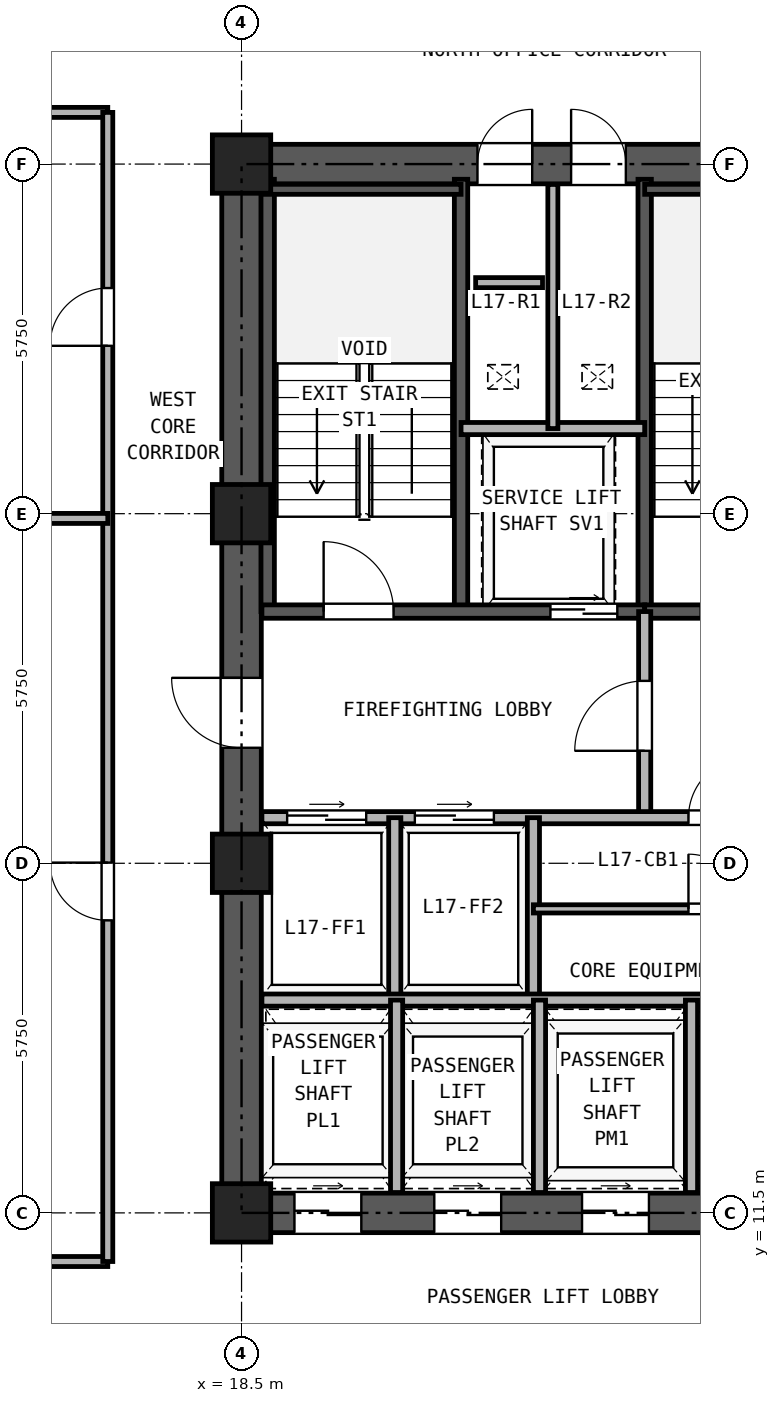
"""IFC4 building model, lengths in metres.
Left out: names, types, materials, properties, quantities, classifications, styles, units other than length and angle.
Written with IfcOpenShell. Run it as: python <this file> out.ifc"""

import sys

from ifc_helpers import new_model, si_unit, direction, frame, frame_2d, origin, origin_2d, place, context, subcontext, project, spatial, rectangle, hollow_rectangle, extrude, source, transform, mapped, element, fill, save


model = new_model("IFC4")
c1 = context("Model", 3, precision=1e-05, world=origin(), true_north=direction((0.0, 1.0)))
c2 = subcontext(c1, "Body", "Model", "MODEL_VIEW")
j1 = project(units=[si_unit("LENGTHUNIT", "METRE"), si_unit("PLANEANGLEUNIT", "RADIAN")], contexts=[c1])
p1 = place(None, origin())
s1 = spatial("IfcSite", under=j1, at=p1, CompositionType="ELEMENT")
p2 = place(p1, origin())
s2 = spatial("IfcBuilding", under=s1, at=p2, CompositionType="ELEMENT")
p3 = place(p2, frame((0.0, 0.0, 65.7)))
s3 = spatial("IfcBuildingStorey", under=s2, at=p3, CompositionType="ELEMENT", Elevation=65.7)
m1 = source(origin(), c2, "Body", "SweptSolid", [
    extrude(hollow_rectangle(XDim=0.96, YDim=0.96, WallThickness=0.06, at=origin_2d()), origin(), (0.0, 0.0, 1.0), 3.32),
])
for number, where, z_axis, x_axis in (
    (1, (18.5, 11.5, 0.0), (0.0, 0.0, 1.0), (1.0, 0.0, 0.0)),
    (2, (18.5, 17.25, 0.0), (0.0, 0.0, 1.0), (1.0, 0.0, 0.0)),
    (3, (18.5, 23.0, 0.0), (0.0, 0.0, 1.0), (1.0, 0.0, 0.0)),
    (4, (18.5, 28.75, 0.0), (0.0, 0.0, 1.0), (1.0, 0.0, 0.0)),
):
    element("IfcColumn", number, at=place(p3, frame(where, z_axis=z_axis, x_axis=x_axis)), inside=s3, PredefinedType="COLUMN", context=c2, shape_type="MappedRepresentation", body=[
        mapped(m1, transform((0.0, 0.0, 0.0), x_axis=(1.0, 0.0, 0.0), y_axis=(0.0, 1.0, 0.0), z_axis=(0.0, 0.0, 1.0), scale=1.0)),
    ])
p4 = place(p3, frame((18.175, 11.5, 0.0), z_axis=(0.0, 0.0, 1.0), x_axis=(1.0, 0.0, 0.0)))
e5 = element("IfcWall", 5, at=p4, inside=s3, PredefinedType="SHEAR", context=c2, shape_type="SweptSolid", body=[
    extrude(rectangle(XDim=10.65, YDim=0.65, at=frame_2d((5.325, 0.0))), origin(), (0.0, 0.0, 1.0), 3.32),
])
p5 = place(p4, frame((1.195, 0.0, 0.0)))
e6 = element("IfcOpeningElement", 6, at=p5, cuts=e5, PredefinedType="OPENING", context=c2, shape_type="SweptSolid", body=[
    extrude(rectangle(XDim=1.1, YDim=2.25, at=frame_2d((0.55, 1.125))), frame((0.0, 0.335, 0.0), z_axis=(0.0, -1.0, 0.0), x_axis=(1.0, 0.0, 0.0)), (0.0, 0.0, 1.0), 0.67),
])
p6 = place(p4, frame((3.495, 0.0, 0.0)))
e7 = element("IfcOpeningElement", 7, at=p6, cuts=e5, PredefinedType="OPENING", context=c2, shape_type="SweptSolid", body=[
    extrude(rectangle(XDim=1.1, YDim=2.25, at=frame_2d((0.55, 1.125))), frame((0.0, 0.335, 0.0), z_axis=(0.0, -1.0, 0.0), x_axis=(1.0, 0.0, 0.0)), (0.0, 0.0, 1.0), 0.67),
])
p7 = place(p4, frame((5.925, 0.0, 0.0)))
e8 = element("IfcOpeningElement", 8, at=p7, cuts=e5, PredefinedType="OPENING", context=c2, shape_type="SweptSolid", body=[
    extrude(rectangle(XDim=1.1, YDim=2.25, at=frame_2d((0.55, 1.125))), frame((0.0, 0.335, 0.0), z_axis=(0.0, -1.0, 0.0), x_axis=(1.0, 0.0, 0.0)), (0.0, 0.0, 1.0), 0.67),
])
p8 = place(p4, frame((8.325, 0.0, 0.0)))
e9 = element("IfcOpeningElement", 9, at=p8, cuts=e5, PredefinedType="OPENING", context=c2, shape_type="SweptSolid", body=[
    extrude(rectangle(XDim=1.1, YDim=2.25, at=frame_2d((0.55, 1.125))), frame((0.0, 0.335, 0.0), z_axis=(0.0, -1.0, 0.0), x_axis=(1.0, 0.0, 0.0)), (0.0, 0.0, 1.0), 0.67),
])
p9 = place(p3, frame((18.175, 28.75, 0.0), z_axis=(0.0, 0.0, 1.0), x_axis=(1.0, 0.0, 0.0)))
e10 = element("IfcWall", 10, at=p9, inside=s3, PredefinedType="SHEAR", context=c2, shape_type="SweptSolid", body=[
    extrude(rectangle(XDim=10.65, YDim=0.65, at=frame_2d((5.325, 0.0))), origin(), (0.0, 0.0, 1.0), 3.32),
])
p10 = place(p9, frame((4.205, 0.0, 0.0)))
e11 = element("IfcOpeningElement", 11, at=p10, cuts=e10, PredefinedType="OPENING", context=c2, shape_type="SweptSolid", body=[
    extrude(rectangle(XDim=0.9, YDim=2.05, at=frame_2d((0.45, 1.025))), frame((0.0, 0.335, 0.0), z_axis=(0.0, -1.0, 0.0), x_axis=(1.0, 0.0, 0.0)), (0.0, 0.0, 1.0), 0.67),
])
p11 = place(p9, frame((5.745, 0.0, 0.0)))
e12 = element("IfcOpeningElement", 12, at=p11, cuts=e10, PredefinedType="OPENING", context=c2, shape_type="SweptSolid", body=[
    extrude(rectangle(XDim=0.9, YDim=2.05, at=frame_2d((0.45, 1.025))), frame((0.0, 0.335, 0.0), z_axis=(0.0, -1.0, 0.0), x_axis=(1.0, 0.0, 0.0)), (0.0, 0.0, 1.0), 0.67),
])
p12 = place(p3, frame((18.5, 11.825, 0.0), z_axis=(0.0, 0.0, 1.0), x_axis=(0.0, 1.0, 0.0)))
e13 = element("IfcWall", 13, at=p12, inside=s3, PredefinedType="SHEAR", context=c2, shape_type="SweptSolid", body=[
    extrude(rectangle(XDim=16.6, YDim=0.65, at=frame_2d((8.3, 0.0))), origin(), (0.0, 0.0, 1.0), 3.32),
])
p13 = place(p12, frame((7.325, 0.0, 0.0)))
e14 = element("IfcOpeningElement", 14, at=p13, cuts=e13, PredefinedType="OPENING", context=c2, shape_type="SweptSolid", body=[
    extrude(rectangle(XDim=1.15, YDim=2.2, at=frame_2d((0.575, 1.1))), frame((0.0, 0.335, 0.0), z_axis=(0.0, -1.0, 0.0), x_axis=(1.0, 0.0, 0.0)), (0.0, 0.0, 1.0), 0.67),
])
for number, where, z_axis, x_axis in (
    (15, (18.93, 21.39, 0.0), (0.0, 0.0, 1.0), (0.0, 1.0, 0.0)),
    (16, (22.11, 21.39, 0.0), (0.0, 0.0, 1.0), (0.0, 1.0, 0.0)),
    (17, (25.13, 21.39, 0.0), (0.0, 0.0, 1.0), (0.0, 1.0, 0.0)),
):
    element("IfcWall", number, at=place(p3, frame(where, z_axis=z_axis, x_axis=x_axis)), inside=s3, PredefinedType="SOLIDWALL", context=c2, shape_type="SweptSolid", body=[
        extrude(rectangle(XDim=7.11, YDim=0.22, at=frame_2d((3.555, 0.0))), origin(), (0.0, 0.0, 1.0), 3.32),
    ])
p14 = place(p3, frame((18.835, 28.335, 0.0), z_axis=(0.0, 0.0, 1.0), x_axis=(1.0, 0.0, 0.0)))
e18 = element("IfcWall", 18, at=p14, inside=s3, PredefinedType="PARTITIONING", context=c2, shape_type="SweptSolid", body=[
    extrude(rectangle(XDim=3.275, YDim=0.165, at=frame_2d((1.638, 0.0))), origin(), (0.0, 0.0, 1.0), 3.32),
])
p15 = place(p3, frame((25.13, 28.335, 0.0), z_axis=(0.0, 0.0, 1.0), x_axis=(1.0, 0.0, 0.0)))
e19 = element("IfcWall", 19, at=p15, inside=s3, PredefinedType="PARTITIONING", context=c2, shape_type="SweptSolid", body=[
    extrude(rectangle(XDim=3.035, YDim=0.165, at=frame_2d((1.518, 0.0))), origin(), (0.0, 0.0, 1.0), 3.32),
])
p16 = place(p3, frame((18.835, 21.39, 0.0), z_axis=(0.0, 0.0, 1.0), x_axis=(1.0, 0.0, 0.0)))
e20 = element("IfcWall", 20, at=p16, inside=s3, PredefinedType="SOLIDWALL", context=c2, shape_type="SweptSolid", body=[
    extrude(rectangle(XDim=6.295, YDim=0.22, at=frame_2d((3.147, 0.0))), origin(), (0.0, 0.0, 1.0), 3.32),
])
p17 = place(p16, frame((1.015, 0.0, 0.0)))
e21 = element("IfcOpeningElement", 21, at=p17, cuts=e20, PredefinedType="OPENING", context=c2, shape_type="SweptSolid", body=[
    extrude(rectangle(XDim=1.15, YDim=2.2, at=frame_2d((0.575, 1.1))), frame((0.0, 0.12, 0.0), z_axis=(0.0, -1.0, 0.0), x_axis=(1.0, 0.0, 0.0)), (0.0, 0.0, 1.0), 0.24),
])
p18 = place(p16, frame((4.745, 0.0, 0.0)))
e22 = element("IfcOpeningElement", 22, at=p18, cuts=e20, PredefinedType="OPENING", context=c2, shape_type="SweptSolid", body=[
    extrude(rectangle(XDim=1.1, YDim=2.25, at=frame_2d((0.55, 1.125))), frame((0.0, 0.12, 0.0), z_axis=(0.0, -1.0, 0.0), x_axis=(1.0, 0.0, 0.0)), (0.0, 0.0, 1.0), 0.24),
])
p19 = place(p3, frame((25.13, 21.39, 0.0), z_axis=(0.0, 0.0, 1.0), x_axis=(1.0, 0.0, 0.0)))
e23 = element("IfcWall", 23, at=p19, inside=s3, PredefinedType="SOLIDWALL", context=c2, shape_type="SweptSolid", body=[
    extrude(rectangle(XDim=3.035, YDim=0.22, at=frame_2d((1.518, 0.0))), origin(), (0.0, 0.0, 1.0), 3.32),
])
p20 = place(p19, frame((0.92, 0.0, 0.0)))
e24 = element("IfcOpeningElement", 24, at=p20, cuts=e23, PredefinedType="OPENING", context=c2, shape_type="SweptSolid", body=[
    extrude(rectangle(XDim=1.15, YDim=2.2, at=frame_2d((0.575, 1.1))), frame((0.0, 0.12, 0.0), z_axis=(0.0, -1.0, 0.0), x_axis=(1.0, 0.0, 0.0)), (0.0, 0.0, 1.0), 0.24),
])
p21 = place(p3, frame((22.11, 24.4, 0.0), z_axis=(0.0, 0.0, 1.0), x_axis=(1.0, 0.0, 0.0)))
e25 = element("IfcWall", 25, at=p21, inside=s3, PredefinedType="PARTITIONING", context=c2, shape_type="SweptSolid", body=[
    extrude(rectangle(XDim=3.02, YDim=0.2, at=frame_2d((1.51, 0.0))), origin(), (0.0, 0.0, 1.0), 3.32),
])
p22 = place(p3, frame((23.62, 24.4, 0.0), z_axis=(0.0, 0.0, 1.0), x_axis=(0.0, 1.0, 0.0)))
e26 = element("IfcWall", 26, at=p22, inside=s3, PredefinedType="PARTITIONING", context=c2, shape_type="SweptSolid", body=[
    extrude(rectangle(XDim=4.015, YDim=0.165, at=frame_2d((2.008, 0.0))), origin(), (0.0, 0.0, 1.0), 3.32),
])
p23 = place(p3, frame((25.13, 18.0, 0.0), z_axis=(0.0, 0.0, 1.0), x_axis=(0.0, 1.0, 0.0)))
e27 = element("IfcWall", 27, at=p23, inside=s3, PredefinedType="PARTITIONING", context=c2, shape_type="SweptSolid", body=[
    extrude(rectangle(XDim=3.39, YDim=0.2, at=frame_2d((1.695, 0.0))), origin(), (0.0, 0.0, 1.0), 3.32),
])
p24 = place(p23, frame((1.1, 0.0, 0.0)))
e28 = element("IfcOpeningElement", 28, at=p24, cuts=e27, PredefinedType="OPENING", context=c2, shape_type="SweptSolid", body=[
    extrude(rectangle(XDim=1.15, YDim=2.2, at=frame_2d((0.575, 1.1))), frame((0.0, 0.11, 0.0), z_axis=(0.0, -1.0, 0.0), x_axis=(1.0, 0.0, 0.0)), (0.0, 0.0, 1.0), 0.22),
])
p25 = place(p3, frame((18.835, 18.0, 0.0), z_axis=(0.0, 0.0, 1.0), x_axis=(1.0, 0.0, 0.0)))
e29 = element("IfcWall", 29, at=p25, inside=s3, PredefinedType="PARTITIONING", context=c2, shape_type="SweptSolid", body=[
    extrude(rectangle(XDim=9.33, YDim=0.2, at=frame_2d((4.665, 0.0))), origin(), (0.0, 0.0, 1.0), 3.32),
])
p26 = place(p25, frame((0.415, 0.0, 0.0)))
e30 = element("IfcOpeningElement", 30, at=p26, cuts=e29, PredefinedType="OPENING", context=c2, shape_type="SweptSolid", body=[
    extrude(rectangle(XDim=1.3, YDim=2.3, at=frame_2d((0.65, 1.15))), frame((0.0, 0.11, 0.0), z_axis=(0.0, -1.0, 0.0), x_axis=(1.0, 0.0, 0.0)), (0.0, 0.0, 1.0), 0.22),
])
p27 = place(p25, frame((2.515, 0.0, 0.0)))
e31 = element("IfcOpeningElement", 31, at=p27, cuts=e29, PredefinedType="OPENING", context=c2, shape_type="SweptSolid", body=[
    extrude(rectangle(XDim=1.3, YDim=2.3, at=frame_2d((0.65, 1.15))), frame((0.0, 0.11, 0.0), z_axis=(0.0, -1.0, 0.0), x_axis=(1.0, 0.0, 0.0)), (0.0, 0.0, 1.0), 0.22),
])
p28 = place(p25, frame((7.015, 0.0, 0.0)))
e32 = element("IfcOpeningElement", 32, at=p28, cuts=e29, PredefinedType="OPENING", context=c2, shape_type="SweptSolid", body=[
    extrude(rectangle(XDim=1.0, YDim=2.15, at=frame_2d((0.5, 1.075))), frame((0.0, 0.11, 0.0), z_axis=(0.0, -1.0, 0.0), x_axis=(1.0, 0.0, 0.0)), (0.0, 0.0, 1.0), 0.22),
])
for number, where, z_axis, x_axis in (
    (33, (21.02, 15.0, 0.0), (0.0, 0.0, 1.0), (0.0, 1.0, 0.0)),
    (34, (23.3, 15.0, 0.0), (0.0, 0.0, 1.0), (0.0, 1.0, 0.0)),
):
    element("IfcWall", number, at=place(p3, frame(where, z_axis=z_axis, x_axis=x_axis)), inside=s3, PredefinedType="PARTITIONING", context=c2, shape_type="SweptSolid", body=[
        extrude(rectangle(XDim=3.0, YDim=0.2, at=frame_2d((1.5, 0.0))), origin(), (0.0, 0.0, 1.0), 3.32),
    ])
p29 = place(p3, frame((18.835, 15.0, 0.0), z_axis=(0.0, 0.0, 1.0), x_axis=(1.0, 0.0, 0.0)))
e35 = element("IfcWall", 35, at=p29, inside=s3, PredefinedType="PARTITIONING", context=c2, shape_type="SweptSolid", body=[
    extrude(rectangle(XDim=9.33, YDim=0.2, at=frame_2d((4.665, 0.0))), origin(), (0.0, 0.0, 1.0), 3.32),
])
p30 = place(p3, frame((23.3, 16.5, 0.0), z_axis=(0.0, 0.0, 1.0), x_axis=(1.0, 0.0, 0.0)))
e36 = element("IfcWall", 36, at=p30, inside=s3, PredefinedType="PARTITIONING", context=c2, shape_type="SweptSolid", body=[
    extrude(rectangle(XDim=4.865, YDim=0.135, at=frame_2d((2.433, 0.0))), origin(), (0.0, 0.0, 1.0), 3.32),
])
p31 = place(p30, frame((2.55, 0.0, 0.0)))
e37 = element("IfcOpeningElement", 37, at=p31, cuts=e36, PredefinedType="OPENING", context=c2, shape_type="SweptSolid", body=[
    extrude(rectangle(XDim=0.9, YDim=2.05, at=frame_2d((0.45, 1.025))), frame((0.0, 0.077, 0.0), z_axis=(0.0, -1.0, 0.0), x_axis=(1.0, 0.0, 0.0)), (0.0, 0.0, 1.0), 0.155),
])
for number, where, z_axis, x_axis in (
    (38, (21.05, 11.835, 0.0), (0.0, 0.0, 1.0), (0.0, 1.0, 0.0)),
    (39, (23.4, 11.835, 0.0), (0.0, 0.0, 1.0), (0.0, 1.0, 0.0)),
    (40, (25.9, 11.835, 0.0), (0.0, 0.0, 1.0), (0.0, 1.0, 0.0)),
):
    element("IfcWall", number, at=place(p3, frame(where, z_axis=z_axis, x_axis=x_axis)), inside=s3, PredefinedType="PARTITIONING", context=c2, shape_type="SweptSolid", body=[
        extrude(rectangle(XDim=3.165, YDim=0.2, at=frame_2d((1.583, 0.0))), origin(), (0.0, 0.0, 1.0), 3.32),
    ])
for number, where, z_axis, x_axis in (
    (41, (7.8, 10.7, 0.0), (0.0, 0.0, 1.0), (1.0, 0.0, 0.0)),
    (42, (7.8, 29.6, 0.0), (0.0, 0.0, 1.0), (1.0, 0.0, 0.0)),
):
    element("IfcWall", number, at=place(p3, frame(where, z_axis=z_axis, x_axis=x_axis)), inside=s3, PredefinedType="PARTITIONING", context=c2, shape_type="SweptSolid", body=[
        extrude(rectangle(XDim=8.5, YDim=0.165, at=frame_2d((4.25, 0.0))), origin(), (0.0, 0.0, 1.0), 3.32),
    ])
p32 = place(p3, frame((16.3, 10.7, 0.0), z_axis=(0.0, 0.0, 1.0), x_axis=(0.0, 1.0, 0.0)))
e43 = element("IfcWall", 43, at=p32, inside=s3, PredefinedType="PARTITIONING", context=c2, shape_type="SweptSolid", body=[
    extrude(rectangle(XDim=18.9, YDim=0.165, at=frame_2d((9.45, 0.0))), origin(), (0.0, 0.0, 1.0), 3.32),
])
p33 = place(p32, frame((5.611, 0.0, 0.0)))
e44 = element("IfcOpeningElement", 44, at=p33, cuts=e43, PredefinedType="OPENING", context=c2, shape_type="SweptSolid", body=[
    extrude(rectangle(XDim=0.95, YDim=2.15, at=frame_2d((0.475, 1.075))), frame((0.0, 0.093, 0.0), z_axis=(0.0, -1.0, 0.0), x_axis=(1.0, 0.0, 0.0)), (0.0, 0.0, 1.0), 0.185),
])
p34 = place(p32, frame((15.061, 0.0, 0.0)))
e45 = element("IfcOpeningElement", 45, at=p34, cuts=e43, PredefinedType="OPENING", context=c2, shape_type="SweptSolid", body=[
    extrude(rectangle(XDim=0.95, YDim=2.15, at=frame_2d((0.475, 1.075))), frame((0.0, 0.093, 0.0), z_axis=(0.0, -1.0, 0.0), x_axis=(1.0, 0.0, 0.0)), (0.0, 0.0, 1.0), 0.185),
])
p35 = place(p3, frame((7.8, 22.922, 0.0), z_axis=(0.0, 0.0, 1.0), x_axis=(1.0, 0.0, 0.0)))
e46 = element("IfcWall", 46, at=p35, inside=s3, PredefinedType="PARTITIONING", context=c2, shape_type="SweptSolid", body=[
    extrude(rectangle(XDim=8.5, YDim=0.165, at=frame_2d((4.25, 0.0))), origin(), (0.0, 0.0, 1.0), 2.539),
])
p36 = place(p3, frame((22.35, 26.8, 0.0), z_axis=(0.0, 0.0, 1.0), x_axis=(1.0, 0.0, 0.0)))
e47 = element("IfcWall", 47, at=p36, inside=s3, PredefinedType="PARTITIONING", context=c2, shape_type="SweptSolid", body=[
    extrude(rectangle(XDim=1.1, YDim=0.165, at=frame_2d((0.55, 0.0))), origin(), (0.0, 0.0, 1.0), 3.32),
])
p37 = place(p17, frame((1.15, 0.0, 0.0), z_axis=(0.0, 0.0, 1.0), x_axis=(-1.0, 0.0, 0.0)))
e48 = element("IfcDoor", 48, at=p37, inside=s3, OperationType="SINGLE_SWING_LEFT", PredefinedType="DOOR", context=c2, shape_type="SweptSolid", body=[
    extrude(rectangle(XDim=1.15, YDim=2.2, at=frame_2d((0.575, 1.1))), frame((0.0, 0.025, 0.0), z_axis=(0.0, -1.0, 0.0), x_axis=(1.0, 0.0, 0.0)), (0.0, 0.0, 1.0), 0.05),
])
fill(e21, e48)
p38 = place(p18, frame((1.1, 0.0, 0.0), z_axis=(0.0, 0.0, 1.0), x_axis=(-1.0, 0.0, 0.0)))
e49 = element("IfcDoor", 49, at=p38, inside=s3, OperationType="DOUBLE_DOOR_SLIDING", PredefinedType="DOOR", context=c2, shape_type="SweptSolid", body=[
    extrude(rectangle(XDim=1.1, YDim=2.25, at=frame_2d((0.55, 1.125))), frame((0.0, 0.025, 0.0), z_axis=(0.0, -1.0, 0.0), x_axis=(1.0, 0.0, 0.0)), (0.0, 0.0, 1.0), 0.05),
])
fill(e22, e49)
p39 = place(p24, origin())
e50 = element("IfcDoor", 50, at=p39, inside=s3, OperationType="SINGLE_SWING_LEFT", PredefinedType="DOOR", context=c2, shape_type="SweptSolid", body=[
    extrude(rectangle(XDim=1.15, YDim=2.2, at=frame_2d((0.575, 1.1))), frame((0.0, 0.025, 0.0), z_axis=(0.0, -1.0, 0.0), x_axis=(1.0, 0.0, 0.0)), (0.0, 0.0, 1.0), 0.05),
])
fill(e28, e50)
p40 = place(p26, origin())
e51 = element("IfcDoor", 51, at=p40, inside=s3, OperationType="DOUBLE_DOOR_SLIDING", PredefinedType="DOOR", context=c2, shape_type="SweptSolid", body=[
    extrude(rectangle(XDim=1.3, YDim=2.3, at=frame_2d((0.65, 1.15))), frame((0.0, 0.025, 0.0), z_axis=(0.0, -1.0, 0.0), x_axis=(1.0, 0.0, 0.0)), (0.0, 0.0, 1.0), 0.05),
])
fill(e30, e51)
p41 = place(p27, origin())
e52 = element("IfcDoor", 52, at=p41, inside=s3, OperationType="DOUBLE_DOOR_SLIDING", PredefinedType="DOOR", context=c2, shape_type="SweptSolid", body=[
    extrude(rectangle(XDim=1.3, YDim=2.3, at=frame_2d((0.65, 1.15))), frame((0.0, 0.025, 0.0), z_axis=(0.0, -1.0, 0.0), x_axis=(1.0, 0.0, 0.0)), (0.0, 0.0, 1.0), 0.05),
])
fill(e31, e52)
p42 = place(p28, frame((1.0, 0.0, 0.0), z_axis=(0.0, 0.0, 1.0), x_axis=(-1.0, 0.0, 0.0)))
e53 = element("IfcDoor", 53, at=p42, inside=s3, OperationType="SINGLE_SWING_RIGHT", PredefinedType="DOOR", context=c2, shape_type="SweptSolid", body=[
    extrude(rectangle(XDim=1.0, YDim=2.15, at=frame_2d((0.5, 1.075))), frame((0.0, 0.025, 0.0), z_axis=(0.0, -1.0, 0.0), x_axis=(1.0, 0.0, 0.0)), (0.0, 0.0, 1.0), 0.05),
])
fill(e32, e53)
p43 = place(p31, frame((0.9, 0.0, 0.0), z_axis=(0.0, 0.0, 1.0), x_axis=(-1.0, 0.0, 0.0)))
e54 = element("IfcDoor", 54, at=p43, inside=s3, OperationType="SINGLE_SWING_LEFT", PredefinedType="DOOR", context=c2, shape_type="SweptSolid", body=[
    extrude(rectangle(XDim=0.9, YDim=2.05, at=frame_2d((0.45, 1.025))), frame((0.0, 0.025, 0.0), z_axis=(0.0, -1.0, 0.0), x_axis=(1.0, 0.0, 0.0)), (0.0, 0.0, 1.0), 0.05),
])
fill(e37, e54)
p44 = place(p13, frame((1.15, 0.0, 0.0), z_axis=(0.0, 0.0, 1.0), x_axis=(-1.0, 0.0, 0.0)))
e55 = element("IfcDoor", 55, at=p44, inside=s3, OperationType="SINGLE_SWING_RIGHT", PredefinedType="DOOR", context=c2, shape_type="SweptSolid", body=[
    extrude(rectangle(XDim=1.15, YDim=2.2, at=frame_2d((0.575, 1.1))), frame((0.0, 0.025, 0.0), z_axis=(0.0, -1.0, 0.0), x_axis=(1.0, 0.0, 0.0)), (0.0, 0.0, 1.0), 0.05),
])
fill(e14, e55)
p45 = place(p10, origin())
e56 = element("IfcDoor", 56, at=p45, inside=s3, OperationType="SINGLE_SWING_RIGHT", PredefinedType="DOOR", context=c2, shape_type="SweptSolid", body=[
    extrude(rectangle(XDim=0.9, YDim=2.05, at=frame_2d((0.45, 1.025))), frame((0.0, 0.025, 0.0), z_axis=(0.0, -1.0, 0.0), x_axis=(1.0, 0.0, 0.0)), (0.0, 0.0, 1.0), 0.05),
])
fill(e11, e56)
p46 = place(p11, origin())
e57 = element("IfcDoor", 57, at=p46, inside=s3, OperationType="SINGLE_SWING_LEFT", PredefinedType="DOOR", context=c2, shape_type="SweptSolid", body=[
    extrude(rectangle(XDim=0.9, YDim=2.05, at=frame_2d((0.45, 1.025))), frame((0.0, 0.025, 0.0), z_axis=(0.0, -1.0, 0.0), x_axis=(1.0, 0.0, 0.0)), (0.0, 0.0, 1.0), 0.05),
])
fill(e12, e57)
p47 = place(p5, frame((1.1, 0.0, 0.0), z_axis=(0.0, 0.0, 1.0), x_axis=(-1.0, 0.0, 0.0)))
e58 = element("IfcDoor", 58, at=p47, inside=s3, OperationType="DOUBLE_DOOR_SLIDING", PredefinedType="DOOR", context=c2, shape_type="SweptSolid", body=[
    extrude(rectangle(XDim=1.1, YDim=2.25, at=frame_2d((0.55, 1.125))), frame((0.0, 0.025, 0.0), z_axis=(0.0, -1.0, 0.0), x_axis=(1.0, 0.0, 0.0)), (0.0, 0.0, 1.0), 0.05),
])
fill(e6, e58)
p48 = place(p6, frame((1.1, 0.0, 0.0), z_axis=(0.0, 0.0, 1.0), x_axis=(-1.0, 0.0, 0.0)))
e59 = element("IfcDoor", 59, at=p48, inside=s3, OperationType="DOUBLE_DOOR_SLIDING", PredefinedType="DOOR", context=c2, shape_type="SweptSolid", body=[
    extrude(rectangle(XDim=1.1, YDim=2.25, at=frame_2d((0.55, 1.125))), frame((0.0, 0.025, 0.0), z_axis=(0.0, -1.0, 0.0), x_axis=(1.0, 0.0, 0.0)), (0.0, 0.0, 1.0), 0.05),
])
fill(e7, e59)
p49 = place(p7, frame((1.1, 0.0, 0.0), z_axis=(0.0, 0.0, 1.0), x_axis=(-1.0, 0.0, 0.0)))
e60 = element("IfcDoor", 60, at=p49, inside=s3, OperationType="DOUBLE_DOOR_SLIDING", PredefinedType="DOOR", context=c2, shape_type="SweptSolid", body=[
    extrude(rectangle(XDim=1.1, YDim=2.25, at=frame_2d((0.55, 1.125))), frame((0.0, 0.025, 0.0), z_axis=(0.0, -1.0, 0.0), x_axis=(1.0, 0.0, 0.0)), (0.0, 0.0, 1.0), 0.05),
])
fill(e8, e60)
p50 = place(p33, frame((0.95, 0.0, 0.0), z_axis=(0.0, 0.0, 1.0), x_axis=(-1.0, 0.0, 0.0)))
e61 = element("IfcDoor", 61, at=p50, inside=s3, OperationType="SINGLE_SWING_RIGHT", PredefinedType="DOOR", context=c2, shape_type="SweptSolid", body=[
    extrude(rectangle(XDim=0.95, YDim=2.15, at=frame_2d((0.475, 1.075))), frame((0.0, 0.025, 0.0), z_axis=(0.0, -1.0, 0.0), x_axis=(1.0, 0.0, 0.0)), (0.0, 0.0, 1.0), 0.05),
])
fill(e44, e61)
p51 = place(p34, frame((0.95, 0.0, 0.0), z_axis=(0.0, 0.0, 1.0), x_axis=(-1.0, 0.0, 0.0)))
e62 = element("IfcDoor", 62, at=p51, inside=s3, OperationType="SINGLE_SWING_LEFT", PredefinedType="DOOR", context=c2, shape_type="SweptSolid", body=[
    extrude(rectangle(XDim=0.95, YDim=2.15, at=frame_2d((0.475, 1.075))), frame((0.0, 0.025, 0.0), z_axis=(0.0, -1.0, 0.0), x_axis=(1.0, 0.0, 0.0)), (0.0, 0.0, 1.0), 0.05),
])
fill(e45, e62)
save(model, sys.argv[1])
